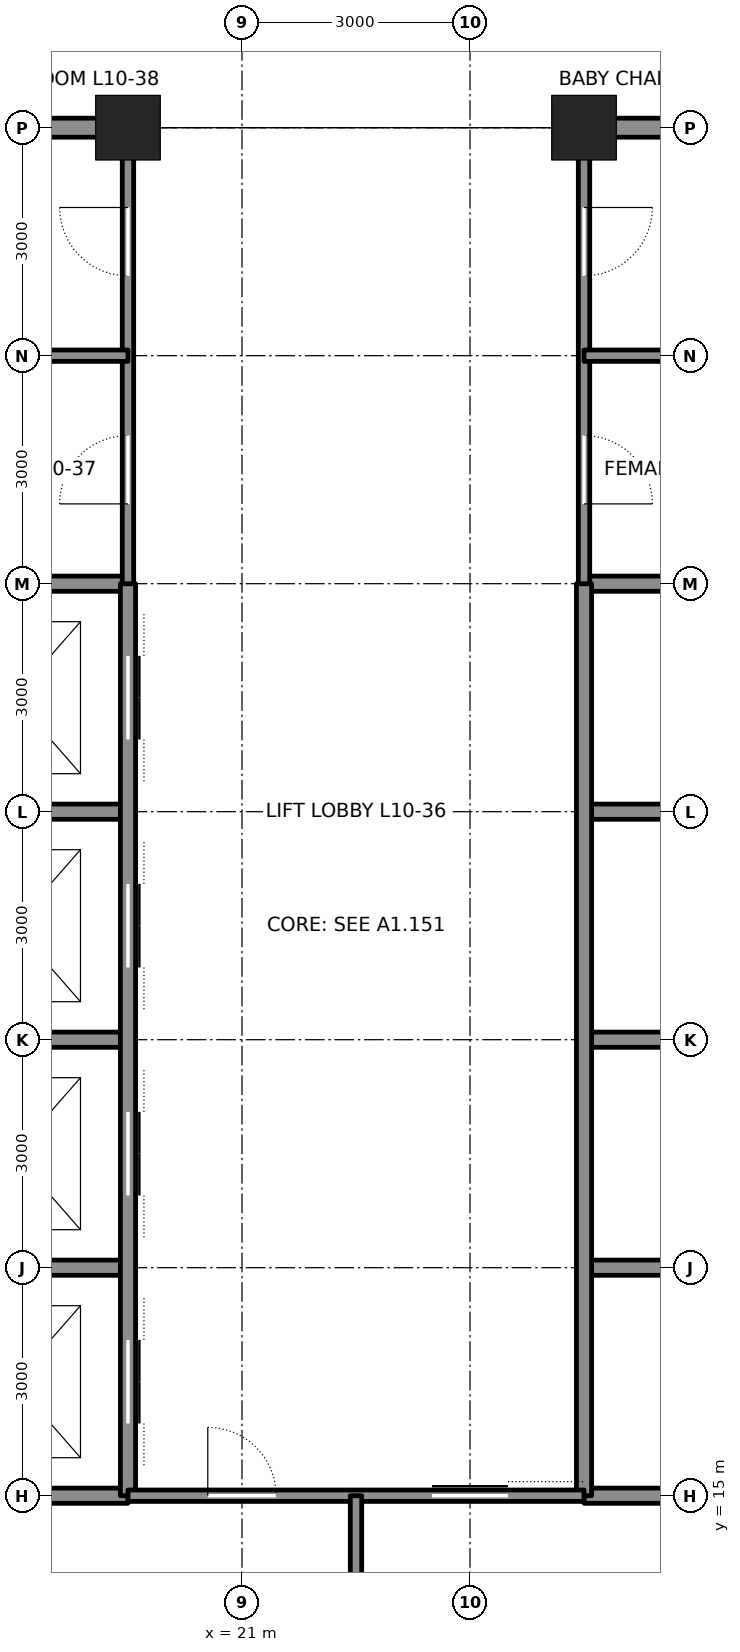
"""IFC4 building model, lengths in metres.
Left out: names, types, materials, properties, quantities, classifications, styles, units other than length and angle.
Written with IfcOpenShell. Run it as: python <this file> out.ifc"""

import sys

from ifc_helpers import new_model, si_unit, direction, frame, frame_2d, origin, origin_2d, place, context, subcontext, project, spatial, rectangle, hollow_rectangle, extrude, element, fill, save


model = new_model("IFC4")
c1 = context("Model", 3, precision=1e-05, world=origin(), true_north=direction((0.0, 1.0)))
c2 = subcontext(c1, "Body", "Model", "MODEL_VIEW")
j1 = project(units=[si_unit("LENGTHUNIT", "METRE"), si_unit("PLANEANGLEUNIT", "RADIAN")], contexts=[c1])
p1 = place(None, origin())
s1 = spatial("IfcSite", under=j1, at=p1, CompositionType="ELEMENT")
p2 = place(p1, origin())
s2 = spatial("IfcBuilding", under=s1, at=p2, CompositionType="ELEMENT")
p3 = place(p2, frame((0.0, 0.0, 51.3)))
s3 = spatial("IfcBuildingStorey", under=s2, at=p3, CompositionType="ELEMENT", Elevation=51.3)
for number, where, z_axis, x_axis in (
    (1, (19.5, 33.0, 0.0), (0.0, 0.0, 1.0), (1.0, 0.0, 0.0)),
    (2, (25.5, 33.0, 0.0), (0.0, 0.0, 1.0), (1.0, 0.0, 0.0)),
):
    element("IfcColumn", number, at=place(p3, frame(where, z_axis=z_axis, x_axis=x_axis)), inside=s3, PredefinedType="COLUMN", context=c2, shape_type="SweptSolid", body=[
        extrude(hollow_rectangle(XDim=0.85, YDim=0.85, WallThickness=0.085, at=origin_2d()), origin(), (0.0, 0.0, 1.0), 4.5),
    ])
for number, where, z_axis, x_axis in (
    (3, (12.0, 15.0, 0.0), (0.0, 0.0, 1.0), (1.0, 0.0, 0.0)),
    (4, (25.5, 15.0, 0.0), (0.0, 0.0, 1.0), (1.0, 0.0, 0.0)),
):
    element("IfcWall", number, at=place(p3, frame(where, z_axis=z_axis, x_axis=x_axis)), inside=s3, PredefinedType="SOLIDWALL", context=c2, shape_type="SweptSolid", body=[
        extrude(rectangle(XDim=7.5, YDim=0.2, at=frame_2d((3.75, 0.0))), origin(), (0.0, 0.0, 1.0), 4.34),
    ])
for number, where, z_axis, x_axis in (
    (5, (16.75, 24.0, 0.0), (0.0, 0.0, 1.0), (1.0, 0.0, 0.0)),
    (6, (25.5, 24.0, 0.0), (0.0, 0.0, 1.0), (1.0, 0.0, 0.0)),
):
    element("IfcWall", number, at=place(p3, frame(where, z_axis=z_axis, x_axis=x_axis)), inside=s3, PredefinedType="SOLIDWALL", context=c2, shape_type="SweptSolid", body=[
        extrude(rectangle(XDim=2.75, YDim=0.2, at=frame_2d((1.375, 0.0))), origin(), (0.0, 0.0, 1.0), 3.39),
    ])
p4 = place(p3, frame((12.0, 27.0, 0.0), z_axis=(0.0, 0.0, 1.0), x_axis=(1.0, 0.0, 0.0)))
e7 = element("IfcWall", 7, at=p4, inside=s3, PredefinedType="SOLIDWALL", context=c2, shape_type="SweptSolid", body=[
    extrude(rectangle(XDim=7.5, YDim=0.2, at=frame_2d((3.75, 0.0))), origin(), (0.0, 0.0, 1.0), 4.34),
])
p5 = place(p4, frame((1.65, 0.0, 0.0)))
e8 = element("IfcOpeningElement", 8, at=p5, cuts=e7, PredefinedType="OPENING", context=c2, shape_type="SweptSolid", body=[
    extrude(rectangle(XDim=1.2, YDim=2.1, at=frame_2d((0.6, 1.05))), frame((0.0, 0.11, 0.0), z_axis=(0.0, -1.0, 0.0), x_axis=(1.0, 0.0, 0.0)), (0.0, 0.0, 1.0), 0.22),
])
p6 = place(p3, frame((25.5, 27.0, 0.0), z_axis=(0.0, 0.0, 1.0), x_axis=(1.0, 0.0, 0.0)))
e9 = element("IfcWall", 9, at=p6, inside=s3, PredefinedType="SOLIDWALL", context=c2, shape_type="SweptSolid", body=[
    extrude(rectangle(XDim=3.0, YDim=0.2, at=frame_2d((1.5, 0.0))), origin(), (0.0, 0.0, 1.0), 4.34),
])
for number, where, z_axis, x_axis in (
    (10, (16.75, 33.0, 0.0), (0.0, 0.0, 1.0), (1.0, 0.0, 0.0)),
    (11, (25.75, 33.0, 0.0), (0.0, 0.0, 1.0), (1.0, 0.0, 0.0)),
):
    element("IfcWall", number, at=place(p3, frame(where, z_axis=z_axis, x_axis=x_axis)), inside=s3, PredefinedType="SOLIDWALL", context=c2, shape_type="SweptSolid", body=[
        extrude(rectangle(XDim=2.5, YDim=0.25, at=frame_2d((1.25, 0.0))), origin(), (0.0, 0.0, 1.0), 3.181),
    ])
p7 = place(p3, frame((16.5, 18.0, 0.0), z_axis=(0.0, 0.0, 1.0), x_axis=(1.0, 0.0, 0.0)))
e12 = element("IfcWall", 12, at=p7, inside=s3, PredefinedType="SOLIDWALL", context=c2, shape_type="SweptSolid", body=[
    extrude(rectangle(XDim=3.0, YDim=0.2, at=frame_2d((1.5, 0.0))), origin(), (0.0, 0.0, 1.0), 4.34),
])
p8 = place(p3, frame((25.5, 18.0, 0.0), z_axis=(0.0, 0.0, 1.0), x_axis=(1.0, 0.0, 0.0)))
e13 = element("IfcWall", 13, at=p8, inside=s3, PredefinedType="SOLIDWALL", context=c2, shape_type="SweptSolid", body=[
    extrude(rectangle(XDim=7.5, YDim=0.2, at=frame_2d((3.75, 0.0))), origin(), (0.0, 0.0, 1.0), 4.34),
])
p9 = place(p8, frame((4.65, 0.0, 0.0)))
e14 = element("IfcOpeningElement", 14, at=p9, cuts=e13, PredefinedType="OPENING", context=c2, shape_type="SweptSolid", body=[
    extrude(rectangle(XDim=1.2, YDim=2.1, at=frame_2d((0.6, 1.05))), frame((0.0, 0.11, 0.0), z_axis=(0.0, -1.0, 0.0), x_axis=(1.0, 0.0, 0.0)), (0.0, 0.0, 1.0), 0.22),
])
for number, where, z_axis, x_axis in (
    (15, (16.75, 21.0, 0.0), (0.0, 0.0, 1.0), (1.0, 0.0, 0.0)),
    (16, (25.5, 21.0, 0.0), (0.0, 0.0, 1.0), (1.0, 0.0, 0.0)),
):
    element("IfcWall", number, at=place(p3, frame(where, z_axis=z_axis, x_axis=x_axis)), inside=s3, PredefinedType="SOLIDWALL", context=c2, shape_type="SweptSolid", body=[
        extrude(rectangle(XDim=2.75, YDim=0.2, at=frame_2d((1.375, 0.0))), origin(), (0.0, 0.0, 1.0), 3.39),
    ])
p10 = place(p3, frame((19.5, 15.0, 0.0), z_axis=(0.0, 0.0, 1.0), x_axis=(0.0, 1.0, 0.0)))
e17 = element("IfcWall", 17, at=p10, inside=s3, PredefinedType="SOLIDWALL", context=c2, shape_type="SweptSolid", body=[
    extrude(rectangle(XDim=12.0, YDim=0.2, at=frame_2d((6.0, 0.0))), origin(), (0.0, 0.0, 1.0), 3.365),
])
p11 = place(p10, frame((0.95, 0.0, 0.0)))
e18 = element("IfcOpeningElement", 18, at=p11, cuts=e17, PredefinedType="OPENING", context=c2, shape_type="SweptSolid", body=[
    extrude(rectangle(XDim=1.1, YDim=2.1, at=frame_2d((0.55, 1.05))), frame((0.0, 0.11, 0.0), z_axis=(0.0, -1.0, 0.0), x_axis=(1.0, 0.0, 0.0)), (0.0, 0.0, 1.0), 0.22),
])
p12 = place(p10, frame((3.95, 0.0, 0.0)))
e19 = element("IfcOpeningElement", 19, at=p12, cuts=e17, PredefinedType="OPENING", context=c2, shape_type="SweptSolid", body=[
    extrude(rectangle(XDim=1.1, YDim=2.1, at=frame_2d((0.55, 1.05))), frame((0.0, 0.11, 0.0), z_axis=(0.0, -1.0, 0.0), x_axis=(1.0, 0.0, 0.0)), (0.0, 0.0, 1.0), 0.22),
])
p13 = place(p10, frame((6.95, 0.0, 0.0)))
e20 = element("IfcOpeningElement", 20, at=p13, cuts=e17, PredefinedType="OPENING", context=c2, shape_type="SweptSolid", body=[
    extrude(rectangle(XDim=1.1, YDim=2.1, at=frame_2d((0.55, 1.05))), frame((0.0, 0.11, 0.0), z_axis=(0.0, -1.0, 0.0), x_axis=(1.0, 0.0, 0.0)), (0.0, 0.0, 1.0), 0.22),
])
p14 = place(p10, frame((9.95, 0.0, 0.0)))
e21 = element("IfcOpeningElement", 21, at=p14, cuts=e17, PredefinedType="OPENING", context=c2, shape_type="SweptSolid", body=[
    extrude(rectangle(XDim=1.1, YDim=2.1, at=frame_2d((0.55, 1.05))), frame((0.0, 0.11, 0.0), z_axis=(0.0, -1.0, 0.0), x_axis=(1.0, 0.0, 0.0)), (0.0, 0.0, 1.0), 0.22),
])
p15 = place(p3, frame((19.5, 27.0, 0.0), z_axis=(0.0, 0.0, 1.0), x_axis=(0.0, 1.0, 0.0)))
e22 = element("IfcWall", 22, at=p15, inside=s3, PredefinedType="PARTITIONING", context=c2, shape_type="SweptSolid", body=[
    extrude(rectangle(XDim=5.75, YDim=0.15, at=frame_2d((2.875, 0.0))), origin(), (0.0, 0.0, 1.0), 3.365),
])
p16 = place(p15, frame((1.05, 0.0, 0.0)))
e23 = element("IfcOpeningElement", 23, at=p16, cuts=e22, PredefinedType="OPENING", context=c2, shape_type="SweptSolid", body=[
    extrude(rectangle(XDim=0.9, YDim=2.1, at=frame_2d((0.45, 1.05))), frame((0.0, 0.085, 0.0), z_axis=(0.0, -1.0, 0.0), x_axis=(1.0, 0.0, 0.0)), (0.0, 0.0, 1.0), 0.17),
])
p17 = place(p15, frame((4.05, 0.0, 0.0)))
e24 = element("IfcOpeningElement", 24, at=p17, cuts=e22, PredefinedType="OPENING", context=c2, shape_type="SweptSolid", body=[
    extrude(rectangle(XDim=0.9, YDim=2.1, at=frame_2d((0.45, 1.05))), frame((0.0, 0.085, 0.0), z_axis=(0.0, -1.0, 0.0), x_axis=(1.0, 0.0, 0.0)), (0.0, 0.0, 1.0), 0.17),
])
p18 = place(p3, frame((25.5, 15.0, 0.0), z_axis=(0.0, 0.0, 1.0), x_axis=(0.0, 1.0, 0.0)))
e25 = element("IfcWall", 25, at=p18, inside=s3, PredefinedType="SOLIDWALL", context=c2, shape_type="SweptSolid", body=[
    extrude(rectangle(XDim=12.0, YDim=0.2, at=frame_2d((6.0, 0.0))), origin(), (0.0, 0.0, 1.0), 3.365),
])
p19 = place(p3, frame((25.5, 27.0, 0.0), z_axis=(0.0, 0.0, 1.0), x_axis=(0.0, 1.0, 0.0)))
e26 = element("IfcWall", 26, at=p19, inside=s3, PredefinedType="PARTITIONING", context=c2, shape_type="SweptSolid", body=[
    extrude(rectangle(XDim=5.75, YDim=0.15, at=frame_2d((2.875, 0.0))), origin(), (0.0, 0.0, 1.0), 3.365),
])
p20 = place(p19, frame((1.05, 0.0, 0.0)))
e27 = element("IfcOpeningElement", 27, at=p20, cuts=e26, PredefinedType="OPENING", context=c2, shape_type="SweptSolid", body=[
    extrude(rectangle(XDim=0.9, YDim=2.1, at=frame_2d((0.45, 1.05))), frame((0.0, 0.085, 0.0), z_axis=(0.0, -1.0, 0.0), x_axis=(1.0, 0.0, 0.0)), (0.0, 0.0, 1.0), 0.17),
])
p21 = place(p19, frame((4.05, 0.0, 0.0)))
e28 = element("IfcOpeningElement", 28, at=p21, cuts=e26, PredefinedType="OPENING", context=c2, shape_type="SweptSolid", body=[
    extrude(rectangle(XDim=0.9, YDim=2.1, at=frame_2d((0.45, 1.05))), frame((0.0, 0.085, 0.0), z_axis=(0.0, -1.0, 0.0), x_axis=(1.0, 0.0, 0.0)), (0.0, 0.0, 1.0), 0.17),
])
p22 = place(p3, frame((19.5, 15.0, 0.0), z_axis=(0.0, 0.0, 1.0), x_axis=(1.0, 0.0, 0.0)))
e29 = element("IfcWall", 29, at=p22, inside=s3, PredefinedType="PARTITIONING", context=c2, shape_type="SweptSolid", body=[
    extrude(rectangle(XDim=6.0, YDim=0.15, at=frame_2d((3.0, 0.0))), origin(), (0.0, 0.0, 1.0), 4.34),
])
p23 = place(p22, frame((4.0, 0.0, 0.0)))
e30 = element("IfcOpeningElement", 30, at=p23, cuts=e29, PredefinedType="OPENING", context=c2, shape_type="SweptSolid", body=[
    extrude(rectangle(XDim=1.0, YDim=2.1, at=frame_2d((0.5, 1.05))), frame((0.0, 0.085, 0.0), z_axis=(0.0, -1.0, 0.0), x_axis=(1.0, 0.0, 0.0)), (0.0, 0.0, 1.0), 0.17),
])
p24 = place(p22, frame((1.05, 0.0, 0.0)))
e31 = element("IfcOpeningElement", 31, at=p24, cuts=e29, PredefinedType="OPENING", context=c2, shape_type="SweptSolid", body=[
    extrude(rectangle(XDim=0.9, YDim=2.1, at=frame_2d((0.45, 1.05))), frame((0.0, 0.085, 0.0), z_axis=(0.0, -1.0, 0.0), x_axis=(1.0, 0.0, 0.0)), (0.0, 0.0, 1.0), 0.17),
])
for number, where, z_axis, x_axis in (
    (32, (22.5, 15.0, 0.0), (0.0, 0.0, 1.0), (0.0, -1.0, 0.0)),
    (33, (16.5, 30.0, 0.0), (0.0, 0.0, 1.0), (1.0, 0.0, 0.0)),
    (34, (25.5, 30.0, 0.0), (0.0, 0.0, 1.0), (1.0, 0.0, 0.0)),
):
    element("IfcWall", number, at=place(p3, frame(where, z_axis=z_axis, x_axis=x_axis)), inside=s3, PredefinedType="PARTITIONING", context=c2, shape_type="SweptSolid", body=[
        extrude(rectangle(XDim=3.0, YDim=0.15, at=frame_2d((1.5, 0.0))), origin(), (0.0, 0.0, 1.0), 4.34),
    ])
p25 = place(p16, origin())
e35 = element("IfcDoor", 35, at=p25, inside=s3, OperationType="SINGLE_SWING_LEFT", PredefinedType="DOOR", context=c2, shape_type="SweptSolid", body=[
    extrude(rectangle(XDim=0.9, YDim=2.1, at=frame_2d((0.45, 1.05))), frame((0.0, 0.025, 0.0), z_axis=(0.0, -1.0, 0.0), x_axis=(1.0, 0.0, 0.0)), (0.0, 0.0, 1.0), 0.05),
])
fill(e23, e35)
p26 = place(p17, origin())
e36 = element("IfcDoor", 36, at=p26, inside=s3, OperationType="SINGLE_SWING_RIGHT", PredefinedType="DOOR", context=c2, shape_type="SweptSolid", body=[
    extrude(rectangle(XDim=0.9, YDim=2.1, at=frame_2d((0.45, 1.05))), frame((0.0, 0.025, 0.0), z_axis=(0.0, -1.0, 0.0), x_axis=(1.0, 0.0, 0.0)), (0.0, 0.0, 1.0), 0.05),
])
fill(e24, e36)
p27 = place(p20, frame((0.9, 0.0, 0.0), z_axis=(0.0, 0.0, 1.0), x_axis=(-1.0, 0.0, 0.0)))
e37 = element("IfcDoor", 37, at=p27, inside=s3, OperationType="SINGLE_SWING_RIGHT", PredefinedType="DOOR", context=c2, shape_type="SweptSolid", body=[
    extrude(rectangle(XDim=0.9, YDim=2.1, at=frame_2d((0.45, 1.05))), frame((0.0, 0.025, 0.0), z_axis=(0.0, -1.0, 0.0), x_axis=(1.0, 0.0, 0.0)), (0.0, 0.0, 1.0), 0.05),
])
fill(e27, e37)
p28 = place(p21, frame((0.9, 0.0, 0.0), z_axis=(0.0, 0.0, 1.0), x_axis=(-1.0, 0.0, 0.0)))
e38 = element("IfcDoor", 38, at=p28, inside=s3, OperationType="SINGLE_SWING_LEFT", PredefinedType="DOOR", context=c2, shape_type="SweptSolid", body=[
    extrude(rectangle(XDim=0.9, YDim=2.1, at=frame_2d((0.45, 1.05))), frame((0.0, 0.025, 0.0), z_axis=(0.0, -1.0, 0.0), x_axis=(1.0, 0.0, 0.0)), (0.0, 0.0, 1.0), 0.05),
])
fill(e28, e38)
p29 = place(p23, origin())
e39 = element("IfcDoor", 39, at=p29, inside=s3, OperationType="SLIDING_TO_LEFT", PredefinedType="DOOR", context=c2, shape_type="SweptSolid", body=[
    extrude(rectangle(XDim=1.0, YDim=2.1, at=frame_2d((0.5, 1.05))), frame((0.0, 0.025, 0.0), z_axis=(0.0, -1.0, 0.0), x_axis=(1.0, 0.0, 0.0)), (0.0, 0.0, 1.0), 0.05),
])
fill(e30, e39)
p30 = place(p24, origin())
e40 = element("IfcDoor", 40, at=p30, inside=s3, OperationType="SINGLE_SWING_LEFT", PredefinedType="DOOR", context=c2, shape_type="SweptSolid", body=[
    extrude(rectangle(XDim=0.9, YDim=2.1, at=frame_2d((0.45, 1.05))), frame((0.0, 0.025, 0.0), z_axis=(0.0, -1.0, 0.0), x_axis=(1.0, 0.0, 0.0)), (0.0, 0.0, 1.0), 0.05),
])
fill(e31, e40)
p31 = place(p11, origin())
e41 = element("IfcDoor", 41, at=p31, inside=s3, OperationType="DOUBLE_DOOR_SLIDING", PredefinedType="DOOR", context=c2, shape_type="SweptSolid", body=[
    extrude(rectangle(XDim=1.1, YDim=2.1, at=frame_2d((0.55, 1.05))), frame((0.0, 0.025, 0.0), z_axis=(0.0, -1.0, 0.0), x_axis=(1.0, 0.0, 0.0)), (0.0, 0.0, 1.0), 0.05),
])
fill(e18, e41)
p32 = place(p12, origin())
e42 = element("IfcDoor", 42, at=p32, inside=s3, OperationType="DOUBLE_DOOR_SLIDING", PredefinedType="DOOR", context=c2, shape_type="SweptSolid", body=[
    extrude(rectangle(XDim=1.1, YDim=2.1, at=frame_2d((0.55, 1.05))), frame((0.0, 0.025, 0.0), z_axis=(0.0, -1.0, 0.0), x_axis=(1.0, 0.0, 0.0)), (0.0, 0.0, 1.0), 0.05),
])
fill(e19, e42)
p33 = place(p13, origin())
e43 = element("IfcDoor", 43, at=p33, inside=s3, OperationType="DOUBLE_DOOR_SLIDING", PredefinedType="DOOR", context=c2, shape_type="SweptSolid", body=[
    extrude(rectangle(XDim=1.1, YDim=2.1, at=frame_2d((0.55, 1.05))), frame((0.0, 0.025, 0.0), z_axis=(0.0, -1.0, 0.0), x_axis=(1.0, 0.0, 0.0)), (0.0, 0.0, 1.0), 0.05),
])
fill(e20, e43)
p34 = place(p14, origin())
e44 = element("IfcDoor", 44, at=p34, inside=s3, OperationType="DOUBLE_DOOR_SLIDING", PredefinedType="DOOR", context=c2, shape_type="SweptSolid", body=[
    extrude(rectangle(XDim=1.1, YDim=2.1, at=frame_2d((0.55, 1.05))), frame((0.0, 0.025, 0.0), z_axis=(0.0, -1.0, 0.0), x_axis=(1.0, 0.0, 0.0)), (0.0, 0.0, 1.0), 0.05),
])
fill(e21, e44)
save(model, sys.argv[1])
